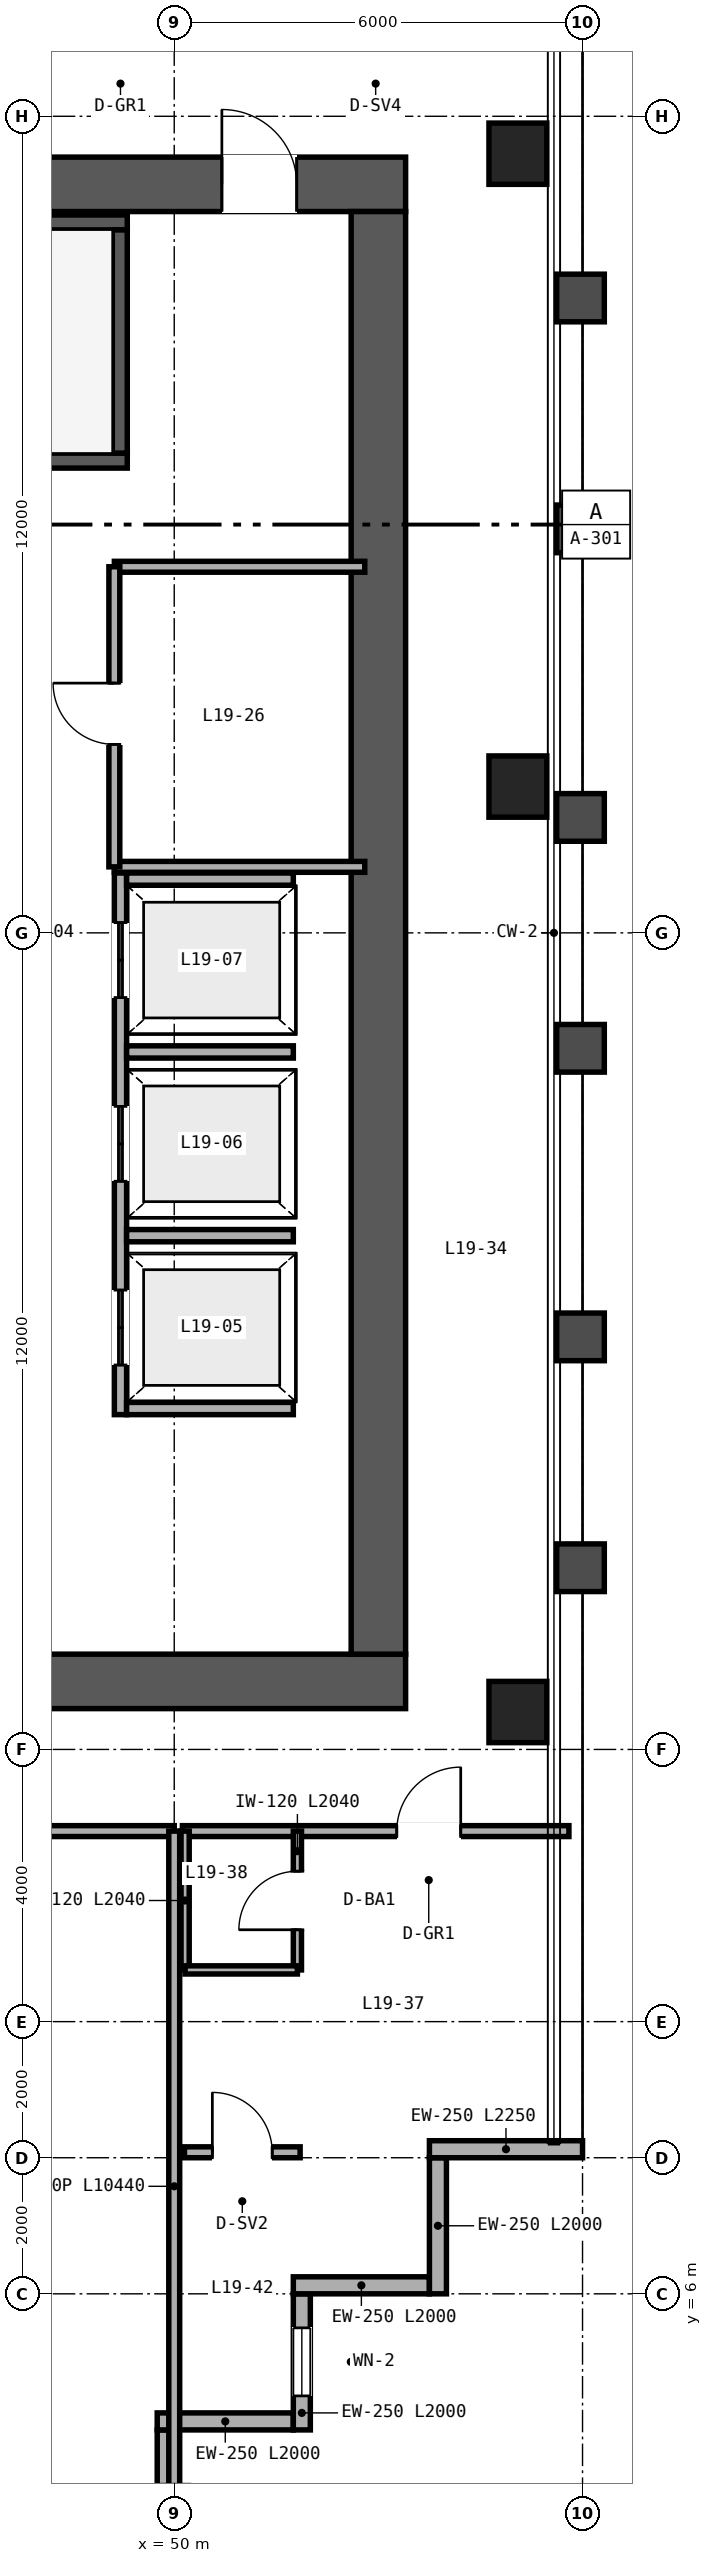
"""IFC4 building model, lengths in metres.
Left out: names, types, materials, properties, quantities, classifications, styles, units other than length and angle.
Written with IfcOpenShell. Run it as: python <this file> out.ifc"""

import sys

from ifc_helpers import new_model, si_unit, direction, frame, frame_2d, origin, origin_2d, place, context, subcontext, project, spatial, rectangle, hollow_rectangle, extrude, source, transform, mapped, element, fill, save


model = new_model("IFC4")
c1 = context("Model", 3, precision=1e-05, world=origin(), true_north=direction((0.0, 1.0)))
c2 = subcontext(c1, "Body", "Model", "MODEL_VIEW")
j1 = project(units=[si_unit("LENGTHUNIT", "METRE"), si_unit("PLANEANGLEUNIT", "RADIAN")], contexts=[c1])
p1 = place(None, origin())
s1 = spatial("IfcSite", under=j1, at=p1, CompositionType="ELEMENT")
p2 = place(p1, origin())
s2 = spatial("IfcBuilding", under=s1, at=p2, CompositionType="ELEMENT")
p3 = place(p2, frame((0.0, 0.0, 78.0)))
s3 = spatial("IfcBuildingStorey", under=s2, at=p3, CompositionType="ELEMENT", Elevation=78.0)
p4 = place(p3, frame((40.6, 15.0, 0.0), z_axis=(0.0, 0.0, 1.0), x_axis=(1.0, 0.0, 0.0)))
e1 = element("IfcWall", 1, at=p4, inside=s3, PredefinedType="SHEAR", context=c2, shape_type="SweptSolid", body=[
    extrude(rectangle(XDim=12.8, YDim=0.8, at=frame_2d((6.4, 0.0))), origin(), (0.0, 0.0, 1.0), 3.35),
])
p5 = place(p4, frame((4.5, 0.0, 0.0)))
e2 = element("IfcOpeningElement", 2, at=p5, cuts=e1, PredefinedType="OPENING", context=c2, shape_type="SweptSolid", body=[
    extrude(rectangle(XDim=1.0, YDim=2.15, at=frame_2d((0.5, 1.075))), frame((0.0, 0.41, 0.0), z_axis=(0.0, -1.0, 0.0), x_axis=(1.0, 0.0, 0.0)), (0.0, 0.0, 1.0), 0.82),
])
p6 = place(p3, frame((40.6, 37.0, 0.0), z_axis=(0.0, 0.0, 1.0), x_axis=(1.0, 0.0, 0.0)))
e3 = element("IfcWall", 3, at=p6, inside=s3, PredefinedType="SHEAR", context=c2, shape_type="SweptSolid", body=[
    extrude(rectangle(XDim=12.8, YDim=0.8, at=frame_2d((6.4, 0.0))), origin(), (0.0, 0.0, 1.0), 3.35),
])
p7 = place(p6, frame((10.1, 0.0, 0.0)))
e4 = element("IfcOpeningElement", 4, at=p7, cuts=e3, PredefinedType="OPENING", context=c2, shape_type="SweptSolid", body=[
    extrude(rectangle(XDim=1.1, YDim=2.15, at=frame_2d((0.55, 1.075))), frame((0.0, 0.41, 0.0), z_axis=(0.0, -1.0, 0.0), x_axis=(1.0, 0.0, 0.0)), (0.0, 0.0, 1.0), 0.82),
])
p8 = place(p3, frame((53.0, 15.4, 0.0), z_axis=(0.0, 0.0, 1.0), x_axis=(0.0, 1.0, 0.0)))
e5 = element("IfcWall", 5, at=p8, inside=s3, PredefinedType="SHEAR", context=c2, shape_type="SweptSolid", body=[
    extrude(rectangle(XDim=21.2, YDim=0.8, at=frame_2d((10.6, 0.0))), origin(), (0.0, 0.0, 1.0), 3.35),
])
p9 = place(p3, frame((41.4, 32.94, 0.0), z_axis=(0.0, 0.0, 1.0), x_axis=(1.0, 0.0, 0.0)))
e6 = element("IfcWall", 6, at=p9, inside=s3, PredefinedType="SHEAR", context=c2, shape_type="SweptSolid", body=[
    extrude(rectangle(XDim=7.91, YDim=0.22, at=frame_2d((3.955, 0.0))), origin(), (0.0, 0.0, 1.0), 3.4),
])
p10 = place(p9, frame((0.52, 0.0, 0.0)))
e7 = element("IfcOpeningElement", 7, at=p10, cuts=e6, PredefinedType="OPENING", context=c2, shape_type="SweptSolid", body=[
    extrude(rectangle(XDim=1.05, YDim=2.15, at=frame_2d((0.525, 1.075))), frame((0.0, 0.12, 0.0), z_axis=(0.0, -1.0, 0.0), x_axis=(1.0, 0.0, 0.0)), (0.0, 0.0, 1.0), 0.24),
])
p11 = place(p3, frame((41.4, 36.44, 0.0), z_axis=(0.0, 0.0, 1.0), x_axis=(1.0, 0.0, 0.0)))
e8 = element("IfcWall", 8, at=p11, inside=s3, PredefinedType="SHEAR", context=c2, shape_type="SweptSolid", body=[
    extrude(rectangle(XDim=7.91, YDim=0.22, at=frame_2d((3.955, 0.0))), origin(), (0.0, 0.0, 1.0), 3.4),
])
p12 = place(p3, frame((49.2, 33.05, 0.0), z_axis=(0.0, 0.0, 1.0), x_axis=(0.0, 1.0, 0.0)))
e9 = element("IfcWall", 9, at=p12, inside=s3, PredefinedType="SHEAR", context=c2, shape_type="SweptSolid", body=[
    extrude(rectangle(XDim=3.28, YDim=0.22, at=frame_2d((1.64, 0.0))), origin(), (0.0, 0.0, 1.0), 3.4),
])
m1 = source(origin(), c2, "Body", "SweptSolid", [
    extrude(hollow_rectangle(XDim=0.85, YDim=0.9, WallThickness=0.04, at=origin_2d()), origin(), (0.0, 0.0, 1.0), 3.35),
])
for number, where, z_axis, x_axis in (
    (10, (55.05, 14.55, 0.0), (0.0, 0.0, 1.0), (1.0, 0.0, 0.0)),
    (11, (55.05, 28.15, 0.0), (0.0, 0.0, 1.0), (1.0, 0.0, 0.0)),
    (12, (55.05, 37.45, 0.0), (0.0, 0.0, 1.0), (1.0, 0.0, 0.0)),
):
    element("IfcColumn", number, at=place(p3, frame(where, z_axis=z_axis, x_axis=x_axis)), inside=s3, PredefinedType="COLUMN", context=c2, shape_type="MappedRepresentation", body=[
        mapped(m1, transform((0.0, 0.0, 0.0), scale=1.0)),
    ])
p13 = place(p3, frame((49.875, 2.0, 0.0), z_axis=(0.0, 0.0, 1.0), x_axis=(0.0, 1.0, 0.0)))
e13 = element("IfcWall", 13, at=p13, inside=s3, PredefinedType="SOLIDWALL", context=c2, shape_type="SweptSolid", body=[
    extrude(rectangle(XDim=2.0, YDim=0.25, at=frame_2d((1.0, 0.0))), origin(), (0.0, 0.0, 1.0), 2.657),
])
p14 = place(p3, frame((49.75, 4.125, 0.0), z_axis=(0.0, 0.0, 1.0), x_axis=(1.0, 0.0, 0.0)))
e14 = element("IfcWall", 14, at=p14, inside=s3, PredefinedType="SOLIDWALL", context=c2, shape_type="SweptSolid", body=[
    extrude(rectangle(XDim=2.0, YDim=0.25, at=frame_2d((1.0, 0.0))), origin(), (0.0, 0.0, 1.0), 3.35),
])
p15 = place(p3, frame((51.875, 4.0, 0.0), z_axis=(0.0, 0.0, 1.0), x_axis=(0.0, 1.0, 0.0)))
e15 = element("IfcWall", 15, at=p15, inside=s3, PredefinedType="SOLIDWALL", context=c2, shape_type="SweptSolid", body=[
    extrude(rectangle(XDim=2.0, YDim=0.25, at=frame_2d((1.0, 0.0))), origin(), (0.0, 0.0, 1.0), 3.35),
])
p16 = place(p15, frame((0.5, 0.0, 0.85)))
e16 = element("IfcOpeningElement", 16, at=p16, cuts=e15, PredefinedType="OPENING", context=c2, shape_type="SweptSolid", body=[
    extrude(rectangle(XDim=1.0, YDim=1.9, at=frame_2d((0.5, 0.95))), frame((0.0, 0.135, 0.0), z_axis=(0.0, -1.0, 0.0), x_axis=(1.0, 0.0, 0.0)), (0.0, 0.0, 1.0), 0.27),
])
for number, where, z_axis, x_axis in (
    (17, (51.75, 6.125, 0.0), (0.0, 0.0, 1.0), (1.0, 0.0, 0.0)),
    (18, (53.875, 6.0, 0.0), (0.0, 0.0, 1.0), (0.0, 1.0, 0.0)),
):
    element("IfcWall", number, at=place(p3, frame(where, z_axis=z_axis, x_axis=x_axis)), inside=s3, PredefinedType="SOLIDWALL", context=c2, shape_type="SweptSolid", body=[
        extrude(rectangle(XDim=2.0, YDim=0.25, at=frame_2d((1.0, 0.0))), origin(), (0.0, 0.0, 1.0), 3.35),
    ])
p17 = place(p3, frame((53.75, 8.125, 0.0), z_axis=(0.0, 0.0, 1.0), x_axis=(1.0, 0.0, 0.0)))
e19 = element("IfcWall", 19, at=p17, inside=s3, PredefinedType="SOLIDWALL", context=c2, shape_type="SweptSolid", body=[
    extrude(rectangle(XDim=2.25, YDim=0.25, at=frame_2d((1.125, 0.0))), origin(), (0.0, 0.0, 1.0), 3.35),
])
p18 = place(p3, frame((49.21, 18.92, 0.0), z_axis=(0.0, 0.0, 1.0), x_axis=(0.0, 1.0, 0.0)))
e20 = element("IfcWall", 20, at=p18, inside=s3, PredefinedType="SOLIDWALL", context=c2, shape_type="SweptSolid", body=[
    extrude(rectangle(XDim=7.96, YDim=0.18, at=frame_2d((3.98, 0.0))), origin(), (0.0, 0.0, 1.0), 3.35),
])
p19 = place(p18, frame((0.73, 0.0, 0.0)))
e21 = element("IfcOpeningElement", 21, at=p19, cuts=e20, PredefinedType="OPENING", context=c2, shape_type="SweptSolid", body=[
    extrude(rectangle(XDim=1.1, YDim=2.2, at=frame_2d((0.55, 1.1))), frame((0.0, 0.1, 0.0), z_axis=(0.0, -1.0, 0.0), x_axis=(1.0, 0.0, 0.0)), (0.0, 0.0, 1.0), 0.2),
])
p20 = place(p18, frame((3.43, 0.0, 0.0)))
e22 = element("IfcOpeningElement", 22, at=p20, cuts=e20, PredefinedType="OPENING", context=c2, shape_type="SweptSolid", body=[
    extrude(rectangle(XDim=1.1, YDim=2.2, at=frame_2d((0.55, 1.1))), frame((0.0, 0.1, 0.0), z_axis=(0.0, -1.0, 0.0), x_axis=(1.0, 0.0, 0.0)), (0.0, 0.0, 1.0), 0.2),
])
p21 = place(p18, frame((6.13, 0.0, 0.0)))
e23 = element("IfcOpeningElement", 23, at=p21, cuts=e20, PredefinedType="OPENING", context=c2, shape_type="SweptSolid", body=[
    extrude(rectangle(XDim=1.1, YDim=2.2, at=frame_2d((0.55, 1.1))), frame((0.0, 0.1, 0.0), z_axis=(0.0, -1.0, 0.0), x_axis=(1.0, 0.0, 0.0)), (0.0, 0.0, 1.0), 0.2),
])
for number, where, z_axis, x_axis in (
    (24, (49.3, 19.01, 0.0), (0.0, 0.0, 1.0), (1.0, 0.0, 0.0)),
    (25, (49.3, 26.79, 0.0), (0.0, 0.0, 1.0), (1.0, 0.0, 0.0)),
    (26, (49.3, 21.55, 0.0), (0.0, 0.0, 1.0), (1.0, 0.0, 0.0)),
    (27, (49.3, 24.25, 0.0), (0.0, 0.0, 1.0), (1.0, 0.0, 0.0)),
):
    element("IfcWall", number, at=place(p3, frame(where, z_axis=z_axis, x_axis=x_axis)), inside=s3, PredefinedType="SOLIDWALL", context=c2, shape_type="SweptSolid", body=[
        extrude(rectangle(XDim=2.45, YDim=0.18, at=frame_2d((1.225, 0.0))), origin(), (0.0, 0.0, 1.0), 3.35),
    ])
p22 = place(p3, frame((49.12, 26.97, 0.0), z_axis=(0.0, 0.0, 1.0), x_axis=(1.0, 0.0, 0.0)))
e28 = element("IfcWall", 28, at=p22, inside=s3, PredefinedType="PARTITIONING", context=c2, shape_type="SweptSolid", body=[
    extrude(rectangle(XDim=3.68, YDim=0.16, at=frame_2d((1.84, 0.0))), origin(), (0.0, 0.0, 1.0), 3.35),
])
p23 = place(p3, frame((49.12, 31.38, 0.0), z_axis=(0.0, 0.0, 1.0), x_axis=(1.0, 0.0, 0.0)))
e29 = element("IfcWall", 29, at=p23, inside=s3, PredefinedType="PARTITIONING", context=c2, shape_type="SweptSolid", body=[
    extrude(rectangle(XDim=3.68, YDim=0.16, at=frame_2d((1.84, 0.0))), origin(), (0.0, 0.0, 1.0), 2.36),
])
p24 = place(p3, frame((49.12, 26.97, 0.0), z_axis=(0.0, 0.0, 1.0), x_axis=(0.0, 1.0, 0.0)))
e30 = element("IfcWall", 30, at=p24, inside=s3, PredefinedType="PARTITIONING", context=c2, shape_type="SweptSolid", body=[
    extrude(rectangle(XDim=4.41, YDim=0.16, at=frame_2d((2.205, 0.0))), origin(), (0.0, 0.0, 1.0), 2.36),
])
p25 = place(p24, frame((1.8, 0.0, 0.0)))
e31 = element("IfcOpeningElement", 31, at=p25, cuts=e30, PredefinedType="OPENING", context=c2, shape_type="SweptSolid", body=[
    extrude(rectangle(XDim=0.9, YDim=2.15, at=frame_2d((0.45, 1.075))), frame((0.0, 0.09, 0.0), z_axis=(0.0, -1.0, 0.0), x_axis=(1.0, 0.0, 0.0)), (0.0, 0.0, 1.0), 0.18),
])
p26 = place(p3, frame((50.12, 12.8, 0.0), z_axis=(0.0, 0.0, 1.0), x_axis=(1.0, 0.0, 0.0)))
e32 = element("IfcWall", 32, at=p26, inside=s3, PredefinedType="PARTITIONING", context=c2, shape_type="SweptSolid", body=[
    extrude(rectangle(XDim=5.68, YDim=0.16, at=frame_2d((2.84, 0.0))), origin(), (0.0, 0.0, 1.0), 3.35),
])
p27 = place(p26, frame((3.15, 0.0, 0.0)))
e33 = element("IfcOpeningElement", 33, at=p27, cuts=e32, PredefinedType="OPENING", context=c2, shape_type="SweptSolid", body=[
    extrude(rectangle(XDim=0.94, YDim=2.15, at=frame_2d((0.47, 1.075))), frame((0.0, 0.09, 0.0), z_axis=(0.0, -1.0, 0.0), x_axis=(1.0, 0.0, 0.0)), (0.0, 0.0, 1.0), 0.18),
])
p28 = place(p3, frame((51.81, 10.76, 0.0), z_axis=(0.0, 0.0, 1.0), x_axis=(0.0, 1.0, 0.0)))
e34 = element("IfcWall", 34, at=p28, inside=s3, PredefinedType="PARTITIONING", context=c2, shape_type="SweptSolid", body=[
    extrude(rectangle(XDim=2.04, YDim=0.12, at=frame_2d((1.02, 0.0))), origin(), (0.0, 0.0, 1.0), 3.35),
])
p29 = place(p28, frame((0.59, 0.0, 0.0)))
e35 = element("IfcOpeningElement", 35, at=p29, cuts=e34, PredefinedType="OPENING", context=c2, shape_type="SweptSolid", body=[
    extrude(rectangle(XDim=0.86, YDim=2.1, at=frame_2d((0.43, 1.05))), frame((0.0, 0.07, 0.0), z_axis=(0.0, -1.0, 0.0), x_axis=(1.0, 0.0, 0.0)), (0.0, 0.0, 1.0), 0.14),
])
p30 = place(p3, frame((50.16, 10.76, 0.0), z_axis=(0.0, 0.0, 1.0), x_axis=(0.0, 1.0, 0.0)))
e36 = element("IfcWall", 36, at=p30, inside=s3, PredefinedType="PARTITIONING", context=c2, shape_type="SweptSolid", body=[
    extrude(rectangle(XDim=2.04, YDim=0.12, at=frame_2d((1.02, 0.0))), origin(), (0.0, 0.0, 1.0), 3.35),
])
p31 = place(p3, frame((50.16, 10.76, 0.0), z_axis=(0.0, 0.0, 1.0), x_axis=(1.0, 0.0, 0.0)))
e37 = element("IfcWall", 37, at=p31, inside=s3, PredefinedType="PARTITIONING", context=c2, shape_type="SweptSolid", body=[
    extrude(rectangle(XDim=1.65, YDim=0.12, at=frame_2d((0.825, 0.0))), origin(), (0.0, 0.0, 1.0), 3.35),
])
p32 = place(p3, frame((50.15, 8.08, 0.0), z_axis=(0.0, 0.0, 1.0), x_axis=(1.0, 0.0, 0.0)))
e38 = element("IfcWall", 38, at=p32, inside=s3, PredefinedType="PARTITIONING", context=c2, shape_type="SweptSolid", body=[
    extrude(rectangle(XDim=1.7, YDim=0.16, at=frame_2d((0.85, 0.0))), origin(), (0.0, 0.0, 1.0), 3.35),
])
p33 = place(p32, frame((0.41, 0.0, 0.0)))
e39 = element("IfcOpeningElement", 39, at=p33, cuts=e38, PredefinedType="OPENING", context=c2, shape_type="SweptSolid", body=[
    extrude(rectangle(XDim=0.88, YDim=2.15, at=frame_2d((0.44, 1.075))), frame((0.0, 0.09, 0.0), z_axis=(0.0, -1.0, 0.0), x_axis=(1.0, 0.0, 0.0)), (0.0, 0.0, 1.0), 0.18),
])
p34 = place(p3, frame((14.0, 12.8, 0.0), z_axis=(0.0, 0.0, 1.0), x_axis=(1.0, 0.0, 0.0)))
e40 = element("IfcWall", 40, at=p34, inside=s3, PredefinedType="PARTITIONING", context=c2, shape_type="SweptSolid", body=[
    extrude(rectangle(XDim=36.0, YDim=0.16, at=frame_2d((18.0, 0.0))), origin(), (0.0, 0.0, 1.0), 2.571),
])
p35 = place(p34, frame((5.9, 0.0, 0.0)))
e41 = element("IfcOpeningElement", 41, at=p35, cuts=e40, PredefinedType="OPENING", context=c2, shape_type="SweptSolid", body=[
    extrude(rectangle(XDim=0.98, YDim=2.2, at=frame_2d((0.49, 1.1))), frame((0.0, 0.09, 0.0), z_axis=(0.0, -1.0, 0.0), x_axis=(1.0, 0.0, 0.0)), (0.0, 0.0, 1.0), 0.18),
])
p36 = place(p34, frame((13.1, 0.0, 0.0)))
e42 = element("IfcOpeningElement", 42, at=p36, cuts=e40, PredefinedType="OPENING", context=c2, shape_type="SweptSolid", body=[
    extrude(rectangle(XDim=0.98, YDim=2.2, at=frame_2d((0.49, 1.1))), frame((0.0, 0.09, 0.0), z_axis=(0.0, -1.0, 0.0), x_axis=(1.0, 0.0, 0.0)), (0.0, 0.0, 1.0), 0.18),
])
p37 = place(p34, frame((20.34, 0.0, 0.0)))
e43 = element("IfcOpeningElement", 43, at=p37, cuts=e40, PredefinedType="OPENING", context=c2, shape_type="SweptSolid", body=[
    extrude(rectangle(XDim=0.94, YDim=2.15, at=frame_2d((0.47, 1.075))), frame((0.0, 0.09, 0.0), z_axis=(0.0, -1.0, 0.0), x_axis=(1.0, 0.0, 0.0)), (0.0, 0.0, 1.0), 0.18),
])
p38 = place(p34, frame((27.34, 0.0, 0.0)))
e44 = element("IfcOpeningElement", 44, at=p38, cuts=e40, PredefinedType="OPENING", context=c2, shape_type="SweptSolid", body=[
    extrude(rectangle(XDim=0.94, YDim=2.15, at=frame_2d((0.47, 1.075))), frame((0.0, 0.09, 0.0), z_axis=(0.0, -1.0, 0.0), x_axis=(1.0, 0.0, 0.0)), (0.0, 0.0, 1.0), 0.18),
])
p39 = place(p34, frame((31.82, 0.0, 0.0)))
e45 = element("IfcOpeningElement", 45, at=p39, cuts=e40, PredefinedType="OPENING", context=c2, shape_type="SweptSolid", body=[
    extrude(rectangle(XDim=0.96, YDim=2.15, at=frame_2d((0.48, 1.075))), frame((0.0, 0.09, 0.0), z_axis=(0.0, -1.0, 0.0), x_axis=(1.0, 0.0, 0.0)), (0.0, 0.0, 1.0), 0.18),
])
p40 = place(p3, frame((50.0, 2.36, 0.0), z_axis=(0.0, 0.0, 1.0), x_axis=(0.0, 1.0, 0.0)))
e46 = element("IfcWall", 46, at=p40, inside=s3, PredefinedType="PARTITIONING", context=c2, shape_type="SweptSolid", body=[
    extrude(rectangle(XDim=10.44, YDim=0.16, at=frame_2d((5.22, 0.0))), origin(), (0.0, 0.0, 1.0), 2.657),
])
m2 = source(origin(), c2, "Body", "SweptSolid", [
    extrude(rectangle(XDim=1.0, YDim=1.9, at=frame_2d((0.5, 0.95))), frame((0.0, 0.03, 0.0), z_axis=(0.0, -1.0, 0.0), x_axis=(1.0, 0.0, 0.0)), (0.0, 0.0, 1.0), 0.06),
])
p41 = place(p16, origin())
e47 = element("IfcWindow", 47, at=p41, inside=s3, PartitioningType="SINGLE_PANEL", PredefinedType="WINDOW", context=c2, shape_type="MappedRepresentation", body=[
    mapped(m2, transform((0.0, 0.0, 0.0), scale=1.0)),
])
fill(e16, e47)
m3 = source(origin(), c2, "Body", "SweptSolid", [
    extrude(rectangle(XDim=1.1, YDim=2.2, at=frame_2d((0.55, 1.1))), frame((0.0, 0.025, 0.0), z_axis=(0.0, -1.0, 0.0), x_axis=(1.0, 0.0, 0.0)), (0.0, 0.0, 1.0), 0.05),
])
p42 = place(p19, origin())
e48 = element("IfcDoor", 48, at=p42, inside=s3, OperationType="DOUBLE_DOOR_SLIDING", PredefinedType="DOOR", context=c2, shape_type="MappedRepresentation", body=[
    mapped(m3, transform((0.0, 0.0, 0.0), scale=1.0)),
])
fill(e21, e48)
p43 = place(p20, origin())
e49 = element("IfcDoor", 49, at=p43, inside=s3, OperationType="DOUBLE_DOOR_SLIDING", PredefinedType="DOOR", context=c2, shape_type="MappedRepresentation", body=[
    mapped(m3, transform((0.0, 0.0, 0.0), scale=1.0)),
])
fill(e22, e49)
p44 = place(p21, origin())
e50 = element("IfcDoor", 50, at=p44, inside=s3, OperationType="DOUBLE_DOOR_SLIDING", PredefinedType="DOOR", context=c2, shape_type="MappedRepresentation", body=[
    mapped(m3, transform((0.0, 0.0, 0.0), scale=1.0)),
])
fill(e23, e50)
m4 = source(origin(), c2, "Body", "SweptSolid", [
    extrude(rectangle(XDim=1.1, YDim=2.15, at=frame_2d((0.55, 1.075))), frame((0.0, 0.025, 0.0), z_axis=(0.0, -1.0, 0.0), x_axis=(1.0, 0.0, 0.0)), (0.0, 0.0, 1.0), 0.05),
])
p45 = place(p7, origin())
e51 = element("IfcDoor", 51, at=p45, inside=s3, OperationType="SINGLE_SWING_LEFT", PredefinedType="DOOR", context=c2, shape_type="MappedRepresentation", body=[
    mapped(m4, transform((0.0, 0.0, 0.0), scale=1.0)),
])
fill(e4, e51)
m5 = source(origin(), c2, "Body", "SweptSolid", [
    extrude(rectangle(XDim=0.9, YDim=2.15, at=frame_2d((0.45, 1.075))), frame((0.0, 0.025, 0.0), z_axis=(0.0, -1.0, 0.0), x_axis=(1.0, 0.0, 0.0)), (0.0, 0.0, 1.0), 0.05),
])
p46 = place(p25, origin())
e52 = element("IfcDoor", 52, at=p46, inside=s3, OperationType="SINGLE_SWING_RIGHT", PredefinedType="DOOR", context=c2, shape_type="MappedRepresentation", body=[
    mapped(m5, transform((0.0, 0.0, 0.0), scale=1.0)),
])
fill(e31, e52)
m6 = source(origin(), c2, "Body", "SweptSolid", [
    extrude(rectangle(XDim=0.86, YDim=2.1, at=frame_2d((0.43, 1.05))), frame((0.0, 0.025, 0.0), z_axis=(0.0, -1.0, 0.0), x_axis=(1.0, 0.0, 0.0)), (0.0, 0.0, 1.0), 0.05),
])
p47 = place(p29, origin())
e53 = element("IfcDoor", 53, at=p47, inside=s3, OperationType="SINGLE_SWING_LEFT", PredefinedType="DOOR", context=c2, shape_type="MappedRepresentation", body=[
    mapped(m6, transform((0.0, 0.0, 0.0), scale=1.0)),
])
fill(e35, e53)
m7 = source(origin(), c2, "Body", "SweptSolid", [
    extrude(rectangle(XDim=0.94, YDim=2.15, at=frame_2d((0.47, 1.075))), frame((0.0, 0.025, 0.0), z_axis=(0.0, -1.0, 0.0), x_axis=(1.0, 0.0, 0.0)), (0.0, 0.0, 1.0), 0.05),
])
p48 = place(p27, origin())
e54 = element("IfcDoor", 54, at=p48, inside=s3, OperationType="SINGLE_SWING_RIGHT", PredefinedType="DOOR", context=c2, shape_type="MappedRepresentation", body=[
    mapped(m7, transform((0.0, 0.0, 0.0), scale=1.0)),
])
fill(e33, e54)
m8 = source(origin(), c2, "Body", "SweptSolid", [
    extrude(rectangle(XDim=0.88, YDim=2.15, at=frame_2d((0.44, 1.075))), frame((0.0, 0.025, 0.0), z_axis=(0.0, -1.0, 0.0), x_axis=(1.0, 0.0, 0.0)), (0.0, 0.0, 1.0), 0.05),
])
p49 = place(p33, origin())
e55 = element("IfcDoor", 55, at=p49, inside=s3, OperationType="SINGLE_SWING_LEFT", PredefinedType="DOOR", context=c2, shape_type="MappedRepresentation", body=[
    mapped(m8, transform((0.0, 0.0, 0.0), scale=1.0)),
])
fill(e39, e55)
save(model, sys.argv[1])
